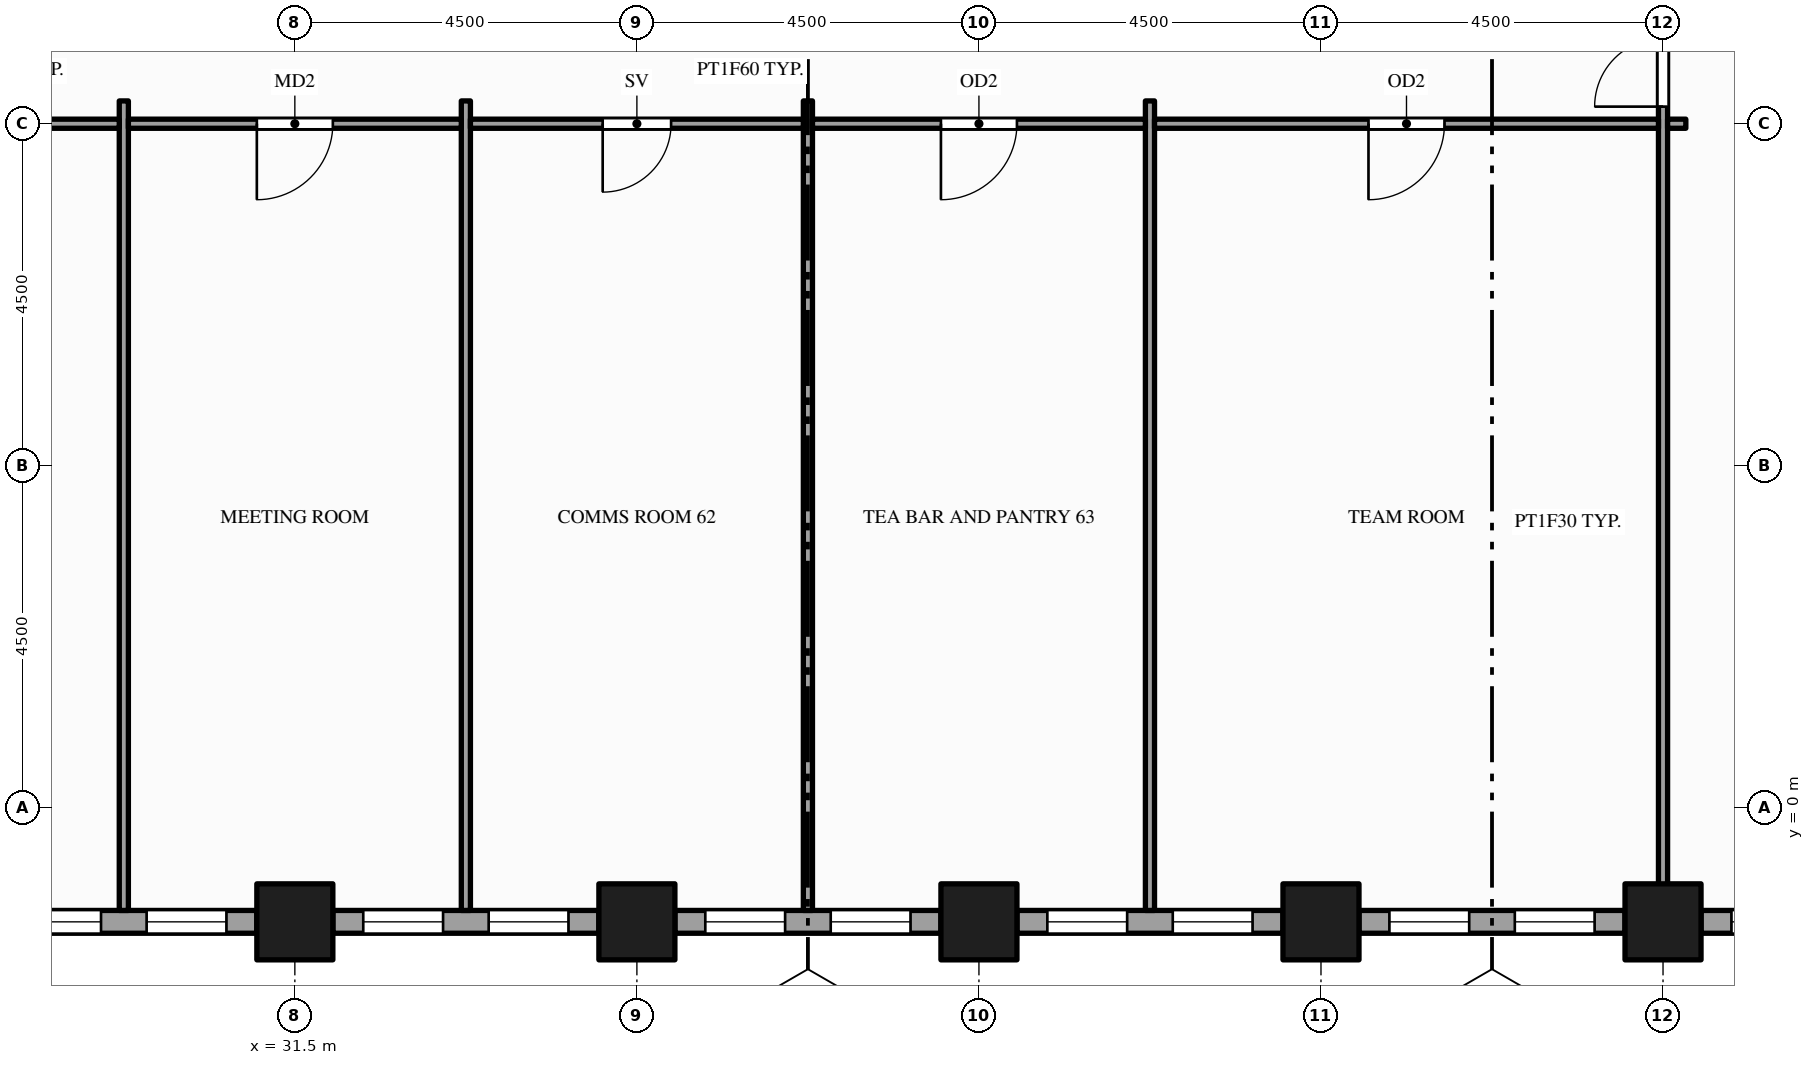
"""IFC4 building model, lengths in metres.
Left out: names, types, materials, properties, quantities, classifications, styles, units other than length and angle.
Written with IfcOpenShell. Run it as: python <this file> out.ifc"""

import sys

from ifc_helpers import new_model, si_unit, direction, frame, frame_2d, origin, origin_2d, place, context, subcontext, project, spatial, rectangle, hollow_rectangle, extrude, element, fill, save


model = new_model("IFC4")
c1 = context("Model", 3, precision=1e-05, world=origin(), true_north=direction((0.0, 1.0)))
c2 = subcontext(c1, "Body", "Model", "MODEL_VIEW")
j1 = project(units=[si_unit("LENGTHUNIT", "METRE"), si_unit("PLANEANGLEUNIT", "RADIAN")], contexts=[c1])
p1 = place(None, origin())
s1 = spatial("IfcSite", under=j1, at=p1, CompositionType="ELEMENT")
p2 = place(p1, origin())
s2 = spatial("IfcBuilding", under=s1, at=p2, CompositionType="ELEMENT")
p3 = place(p2, frame((0.0, 0.0, 95.0)))
s3 = spatial("IfcBuildingStorey", under=s2, at=p3, CompositionType="ELEMENT", Elevation=95.0)
for number, where, z_axis, x_axis in (
    (1, (31.5, -1.5, -0.15), (0.0, 0.0, 1.0), (1.0, 0.0, 0.0)),
    (2, (36.0, -1.5, -0.15), (0.0, 0.0, 1.0), (1.0, 0.0, 0.0)),
    (3, (40.5, -1.5, -0.15), (0.0, 0.0, 1.0), (1.0, 0.0, 0.0)),
    (4, (45.0, -1.5, -0.15), (0.0, 0.0, 1.0), (1.0, 0.0, 0.0)),
    (5, (49.5, -1.5, -0.15), (0.0, 0.0, 1.0), (1.0, 0.0, 0.0)),
):
    element("IfcColumn", number, at=place(p3, frame(where, z_axis=z_axis, x_axis=x_axis)), inside=s3, PredefinedType="COLUMN", context=c2, shape_type="SweptSolid", body=[
        extrude(hollow_rectangle(XDim=1.0, YDim=1.0, WallThickness=0.05, at=origin_2d()), origin(), (0.0, 0.0, 1.0), 4.0),
    ])
p4 = place(p3, frame((27.5, -1.5, 0.0), z_axis=(0.0, 0.0, 1.0), x_axis=(1.0, 0.0, 0.0)))
e6 = element("IfcWall", 6, at=p4, inside=s3, PredefinedType="STANDARD", context=c2, shape_type="SweptSolid", body=[
    extrude(rectangle(XDim=3.5, YDim=0.3, at=frame_2d((1.75, 0.0))), origin(), (0.0, 0.0, 1.0), 3.154),
])
p5 = place(p4, frame((0.4, 0.0, 0.9)))
e7 = element("IfcOpeningElement", 7, at=p5, cuts=e6, PredefinedType="OPENING", context=c2, shape_type="SweptSolid", body=[
    extrude(rectangle(XDim=1.05, YDim=2.0, at=frame_2d((0.525, 1.0))), frame((0.0, 0.16, 0.0), z_axis=(0.0, -1.0, 0.0), x_axis=(1.0, 0.0, 0.0)), (0.0, 0.0, 1.0), 0.32),
])
p6 = place(p4, frame((2.05, 0.0, 0.9)))
e8 = element("IfcOpeningElement", 8, at=p6, cuts=e6, PredefinedType="OPENING", context=c2, shape_type="SweptSolid", body=[
    extrude(rectangle(XDim=1.05, YDim=2.0, at=frame_2d((0.525, 1.0))), frame((0.0, 0.16, 0.0), z_axis=(0.0, -1.0, 0.0), x_axis=(1.0, 0.0, 0.0)), (0.0, 0.0, 1.0), 0.32),
])
p7 = place(p3, frame((32.0, -1.5, 0.0), z_axis=(0.0, 0.0, 1.0), x_axis=(1.0, 0.0, 0.0)))
e9 = element("IfcWall", 9, at=p7, inside=s3, PredefinedType="STANDARD", context=c2, shape_type="SweptSolid", body=[
    extrude(rectangle(XDim=3.5, YDim=0.3, at=frame_2d((1.75, 0.0))), origin(), (0.0, 0.0, 1.0), 3.154),
])
p8 = place(p7, frame((0.4, 0.0, 0.9)))
e10 = element("IfcOpeningElement", 10, at=p8, cuts=e9, PredefinedType="OPENING", context=c2, shape_type="SweptSolid", body=[
    extrude(rectangle(XDim=1.05, YDim=2.0, at=frame_2d((0.525, 1.0))), frame((0.0, 0.16, 0.0), z_axis=(0.0, -1.0, 0.0), x_axis=(1.0, 0.0, 0.0)), (0.0, 0.0, 1.0), 0.32),
])
p9 = place(p7, frame((2.05, 0.0, 0.9)))
e11 = element("IfcOpeningElement", 11, at=p9, cuts=e9, PredefinedType="OPENING", context=c2, shape_type="SweptSolid", body=[
    extrude(rectangle(XDim=1.05, YDim=2.0, at=frame_2d((0.525, 1.0))), frame((0.0, 0.16, 0.0), z_axis=(0.0, -1.0, 0.0), x_axis=(1.0, 0.0, 0.0)), (0.0, 0.0, 1.0), 0.32),
])
p10 = place(p3, frame((36.5, -1.5, 0.0), z_axis=(0.0, 0.0, 1.0), x_axis=(1.0, 0.0, 0.0)))
e12 = element("IfcWall", 12, at=p10, inside=s3, PredefinedType="STANDARD", context=c2, shape_type="SweptSolid", body=[
    extrude(rectangle(XDim=3.5, YDim=0.3, at=frame_2d((1.75, 0.0))), origin(), (0.0, 0.0, 1.0), 3.154),
])
p11 = place(p10, frame((0.4, 0.0, 0.9)))
e13 = element("IfcOpeningElement", 13, at=p11, cuts=e12, PredefinedType="OPENING", context=c2, shape_type="SweptSolid", body=[
    extrude(rectangle(XDim=1.05, YDim=2.0, at=frame_2d((0.525, 1.0))), frame((0.0, 0.16, 0.0), z_axis=(0.0, -1.0, 0.0), x_axis=(1.0, 0.0, 0.0)), (0.0, 0.0, 1.0), 0.32),
])
p12 = place(p10, frame((2.05, 0.0, 0.9)))
e14 = element("IfcOpeningElement", 14, at=p12, cuts=e12, PredefinedType="OPENING", context=c2, shape_type="SweptSolid", body=[
    extrude(rectangle(XDim=1.05, YDim=2.0, at=frame_2d((0.525, 1.0))), frame((0.0, 0.16, 0.0), z_axis=(0.0, -1.0, 0.0), x_axis=(1.0, 0.0, 0.0)), (0.0, 0.0, 1.0), 0.32),
])
p13 = place(p3, frame((41.0, -1.5, 0.0), z_axis=(0.0, 0.0, 1.0), x_axis=(1.0, 0.0, 0.0)))
e15 = element("IfcWall", 15, at=p13, inside=s3, PredefinedType="STANDARD", context=c2, shape_type="SweptSolid", body=[
    extrude(rectangle(XDim=3.5, YDim=0.3, at=frame_2d((1.75, 0.0))), origin(), (0.0, 0.0, 1.0), 3.154),
])
p14 = place(p13, frame((0.4, 0.0, 0.9)))
e16 = element("IfcOpeningElement", 16, at=p14, cuts=e15, PredefinedType="OPENING", context=c2, shape_type="SweptSolid", body=[
    extrude(rectangle(XDim=1.05, YDim=2.0, at=frame_2d((0.525, 1.0))), frame((0.0, 0.16, 0.0), z_axis=(0.0, -1.0, 0.0), x_axis=(1.0, 0.0, 0.0)), (0.0, 0.0, 1.0), 0.32),
])
p15 = place(p13, frame((2.05, 0.0, 0.9)))
e17 = element("IfcOpeningElement", 17, at=p15, cuts=e15, PredefinedType="OPENING", context=c2, shape_type="SweptSolid", body=[
    extrude(rectangle(XDim=1.05, YDim=2.0, at=frame_2d((0.525, 1.0))), frame((0.0, 0.16, 0.0), z_axis=(0.0, -1.0, 0.0), x_axis=(1.0, 0.0, 0.0)), (0.0, 0.0, 1.0), 0.32),
])
p16 = place(p3, frame((45.5, -1.5, 0.0), z_axis=(0.0, 0.0, 1.0), x_axis=(1.0, 0.0, 0.0)))
e18 = element("IfcWall", 18, at=p16, inside=s3, PredefinedType="STANDARD", context=c2, shape_type="SweptSolid", body=[
    extrude(rectangle(XDim=3.5, YDim=0.3, at=frame_2d((1.75, 0.0))), origin(), (0.0, 0.0, 1.0), 3.154),
])
p17 = place(p16, frame((0.4, 0.0, 0.9)))
e19 = element("IfcOpeningElement", 19, at=p17, cuts=e18, PredefinedType="OPENING", context=c2, shape_type="SweptSolid", body=[
    extrude(rectangle(XDim=1.05, YDim=2.0, at=frame_2d((0.525, 1.0))), frame((0.0, 0.16, 0.0), z_axis=(0.0, -1.0, 0.0), x_axis=(1.0, 0.0, 0.0)), (0.0, 0.0, 1.0), 0.32),
])
p18 = place(p16, frame((2.05, 0.0, 0.9)))
e20 = element("IfcOpeningElement", 20, at=p18, cuts=e18, PredefinedType="OPENING", context=c2, shape_type="SweptSolid", body=[
    extrude(rectangle(XDim=1.05, YDim=2.0, at=frame_2d((0.525, 1.0))), frame((0.0, 0.16, 0.0), z_axis=(0.0, -1.0, 0.0), x_axis=(1.0, 0.0, 0.0)), (0.0, 0.0, 1.0), 0.32),
])
p19 = place(p3, frame((50.0, -1.5, 0.0), z_axis=(0.0, 0.0, 1.0), x_axis=(1.0, 0.0, 0.0)))
e21 = element("IfcWall", 21, at=p19, inside=s3, PredefinedType="STANDARD", context=c2, shape_type="SweptSolid", body=[
    extrude(rectangle(XDim=3.5, YDim=0.3, at=frame_2d((1.75, 0.0))), origin(), (0.0, 0.0, 1.0), 3.154),
])
p20 = place(p19, frame((0.4, 0.0, 0.9)))
e22 = element("IfcOpeningElement", 22, at=p20, cuts=e21, PredefinedType="OPENING", context=c2, shape_type="SweptSolid", body=[
    extrude(rectangle(XDim=1.05, YDim=2.0, at=frame_2d((0.525, 1.0))), frame((0.0, 0.16, 0.0), z_axis=(0.0, -1.0, 0.0), x_axis=(1.0, 0.0, 0.0)), (0.0, 0.0, 1.0), 0.32),
])
p21 = place(p19, frame((2.05, 0.0, 0.9)))
e23 = element("IfcOpeningElement", 23, at=p21, cuts=e21, PredefinedType="OPENING", context=c2, shape_type="SweptSolid", body=[
    extrude(rectangle(XDim=1.05, YDim=2.0, at=frame_2d((0.525, 1.0))), frame((0.0, 0.16, 0.0), z_axis=(0.0, -1.0, 0.0), x_axis=(1.0, 0.0, 0.0)), (0.0, 0.0, 1.0), 0.32),
])
for number, where, z_axis, x_axis in (
    (24, (29.25, -1.35, 0.0), (0.0, 0.0, 1.0), (0.0, 1.0, 0.0)),
    (25, (33.75, -1.35, 0.0), (0.0, 0.0, 1.0), (0.0, 1.0, 0.0)),
    (26, (38.25, -1.35, 0.0), (0.0, 0.0, 1.0), (0.0, 1.0, 0.0)),
    (27, (42.75, -1.35, 0.0), (0.0, 0.0, 1.0), (0.0, 1.0, 0.0)),
):
    element("IfcWall", number, at=place(p3, frame(where, z_axis=z_axis, x_axis=x_axis)), inside=s3, PredefinedType="PARTITIONING", context=c2, shape_type="SweptSolid", body=[
        extrude(rectangle(XDim=10.65, YDim=0.12, at=frame_2d((5.325, 0.0))), origin(), (0.0, 0.0, 1.0), 2.938),
    ])
p22 = place(p3, frame((49.5, -1.35, 0.0), z_axis=(0.0, 0.0, 1.0), x_axis=(0.0, 1.0, 0.0)))
e28 = element("IfcWall", 28, at=p22, inside=s3, PredefinedType="PARTITIONING", context=c2, shape_type="SweptSolid", body=[
    extrude(rectangle(XDim=22.2, YDim=0.12, at=frame_2d((11.1, 0.0))), origin(), (0.0, 0.0, 1.0), 2.938),
])
p23 = place(p22, frame((10.575, 0.0, 0.0)))
e29 = element("IfcOpeningElement", 29, at=p23, cuts=e28, PredefinedType="OPENING", context=c2, shape_type="SweptSolid", body=[
    extrude(rectangle(XDim=1.8, YDim=2.1, at=frame_2d((0.9, 1.05))), frame((0.0, 0.07, 0.0), z_axis=(0.0, -1.0, 0.0), x_axis=(1.0, 0.0, 0.0)), (0.0, 0.0, 1.0), 0.14),
])
p24 = place(p22, frame((13.6, 0.0, 0.0)))
e30 = element("IfcOpeningElement", 30, at=p24, cuts=e28, PredefinedType="OPENING", context=c2, shape_type="SweptSolid", body=[
    extrude(rectangle(XDim=0.9, YDim=2.1, at=frame_2d((0.45, 1.05))), frame((0.0, 0.07, 0.0), z_axis=(0.0, -1.0, 0.0), x_axis=(1.0, 0.0, 0.0)), (0.0, 0.0, 1.0), 0.14),
])
p25 = place(p22, frame((17.025, 0.0, 0.0)))
e31 = element("IfcOpeningElement", 31, at=p25, cuts=e28, PredefinedType="OPENING", context=c2, shape_type="SweptSolid", body=[
    extrude(rectangle(XDim=0.9, YDim=2.1, at=frame_2d((0.45, 1.05))), frame((0.0, 0.07, 0.0), z_axis=(0.0, -1.0, 0.0), x_axis=(1.0, 0.0, 0.0)), (0.0, 0.0, 1.0), 0.14),
])
p26 = place(p22, frame((20.35, 0.0, 0.0)))
e32 = element("IfcOpeningElement", 32, at=p26, cuts=e28, PredefinedType="OPENING", context=c2, shape_type="SweptSolid", body=[
    extrude(rectangle(XDim=1.0, YDim=2.1, at=frame_2d((0.5, 1.05))), frame((0.0, 0.07, 0.0), z_axis=(0.0, -1.0, 0.0), x_axis=(1.0, 0.0, 0.0)), (0.0, 0.0, 1.0), 0.14),
])
p27 = place(p3, frame((22.56, 9.0, 0.0), z_axis=(0.0, 0.0, 1.0), x_axis=(1.0, 0.0, 0.0)))
e33 = element("IfcWall", 33, at=p27, inside=s3, PredefinedType="PARTITIONING", context=c2, shape_type="SweptSolid", body=[
    extrude(rectangle(XDim=6.63, YDim=0.12, at=frame_2d((3.315, 0.0))), origin(), (0.0, 0.0, 1.0), 2.76),
])
p28 = place(p27, frame((2.815, 0.0, 0.0)))
e34 = element("IfcOpeningElement", 34, at=p28, cuts=e33, PredefinedType="OPENING", context=c2, shape_type="SweptSolid", body=[
    extrude(rectangle(XDim=1.0, YDim=2.1, at=frame_2d((0.5, 1.05))), frame((0.0, 0.07, 0.0), z_axis=(0.0, -1.0, 0.0), x_axis=(1.0, 0.0, 0.0)), (0.0, 0.0, 1.0), 0.14),
])
p29 = place(p3, frame((29.31, 9.0, 0.0), z_axis=(0.0, 0.0, 1.0), x_axis=(1.0, 0.0, 0.0)))
e35 = element("IfcWall", 35, at=p29, inside=s3, PredefinedType="PARTITIONING", context=c2, shape_type="SweptSolid", body=[
    extrude(rectangle(XDim=4.38, YDim=0.12, at=frame_2d((2.19, 0.0))), origin(), (0.0, 0.0, 1.0), 2.938),
])
p30 = place(p29, frame((1.69, 0.0, 0.0)))
e36 = element("IfcOpeningElement", 36, at=p30, cuts=e35, PredefinedType="OPENING", context=c2, shape_type="SweptSolid", body=[
    extrude(rectangle(XDim=1.0, YDim=2.1, at=frame_2d((0.5, 1.05))), frame((0.0, 0.07, 0.0), z_axis=(0.0, -1.0, 0.0), x_axis=(1.0, 0.0, 0.0)), (0.0, 0.0, 1.0), 0.14),
])
p31 = place(p3, frame((33.81, 9.0, 0.0), z_axis=(0.0, 0.0, 1.0), x_axis=(1.0, 0.0, 0.0)))
e37 = element("IfcWall", 37, at=p31, inside=s3, PredefinedType="PARTITIONING", context=c2, shape_type="SweptSolid", body=[
    extrude(rectangle(XDim=4.38, YDim=0.12, at=frame_2d((2.19, 0.0))), origin(), (0.0, 0.0, 1.0), 2.938),
])
p32 = place(p31, frame((1.74, 0.0, 0.0)))
e38 = element("IfcOpeningElement", 38, at=p32, cuts=e37, PredefinedType="OPENING", context=c2, shape_type="SweptSolid", body=[
    extrude(rectangle(XDim=0.9, YDim=2.1, at=frame_2d((0.45, 1.05))), frame((0.0, 0.07, 0.0), z_axis=(0.0, -1.0, 0.0), x_axis=(1.0, 0.0, 0.0)), (0.0, 0.0, 1.0), 0.14),
])
p33 = place(p3, frame((38.31, 9.0, 0.0), z_axis=(0.0, 0.0, 1.0), x_axis=(1.0, 0.0, 0.0)))
e39 = element("IfcWall", 39, at=p33, inside=s3, PredefinedType="PARTITIONING", context=c2, shape_type="SweptSolid", body=[
    extrude(rectangle(XDim=4.38, YDim=0.12, at=frame_2d((2.19, 0.0))), origin(), (0.0, 0.0, 1.0), 2.938),
])
p34 = place(p33, frame((1.69, 0.0, 0.0)))
e40 = element("IfcOpeningElement", 40, at=p34, cuts=e39, PredefinedType="OPENING", context=c2, shape_type="SweptSolid", body=[
    extrude(rectangle(XDim=1.0, YDim=2.1, at=frame_2d((0.5, 1.05))), frame((0.0, 0.07, 0.0), z_axis=(0.0, -1.0, 0.0), x_axis=(1.0, 0.0, 0.0)), (0.0, 0.0, 1.0), 0.14),
])
p35 = place(p3, frame((42.81, 9.0, 0.0), z_axis=(0.0, 0.0, 1.0), x_axis=(1.0, 0.0, 0.0)))
e41 = element("IfcWall", 41, at=p35, inside=s3, PredefinedType="PARTITIONING", context=c2, shape_type="SweptSolid", body=[
    extrude(rectangle(XDim=6.63, YDim=0.12, at=frame_2d((3.315, 0.0))), origin(), (0.0, 0.0, 1.0), 2.938),
])
p36 = place(p35, frame((2.815, 0.0, 0.0)))
e42 = element("IfcOpeningElement", 42, at=p36, cuts=e41, PredefinedType="OPENING", context=c2, shape_type="SweptSolid", body=[
    extrude(rectangle(XDim=1.0, YDim=2.1, at=frame_2d((0.5, 1.05))), frame((0.0, 0.07, 0.0), z_axis=(0.0, -1.0, 0.0), x_axis=(1.0, 0.0, 0.0)), (0.0, 0.0, 1.0), 0.14),
])
p37 = place(p3, frame((49.56, 9.0, 0.0), z_axis=(0.0, 0.0, 1.0), x_axis=(1.0, 0.0, 0.0)))
e43 = element("IfcWall", 43, at=p37, inside=s3, PredefinedType="PARTITIONING", context=c2, shape_type="SweptSolid", body=[
    extrude(rectangle(XDim=0.24, YDim=0.12, at=frame_2d((0.12, 0.0))), origin(), (0.0, 0.0, 1.0), 2.938),
])
p38 = place(p5, origin())
e44 = element("IfcWindow", 44, at=p38, inside=s3, PartitioningType="SINGLE_PANEL", PredefinedType="WINDOW", context=c2, shape_type="SweptSolid", body=[
    extrude(rectangle(XDim=1.05, YDim=2.0, at=frame_2d((0.525, 1.0))), frame((0.0, 0.03, 0.0), z_axis=(0.0, -1.0, 0.0), x_axis=(1.0, 0.0, 0.0)), (0.0, 0.0, 1.0), 0.06),
])
fill(e7, e44)
p39 = place(p6, origin())
e45 = element("IfcWindow", 45, at=p39, inside=s3, PartitioningType="SINGLE_PANEL", PredefinedType="WINDOW", context=c2, shape_type="SweptSolid", body=[
    extrude(rectangle(XDim=1.05, YDim=2.0, at=frame_2d((0.525, 1.0))), frame((0.0, 0.03, 0.0), z_axis=(0.0, -1.0, 0.0), x_axis=(1.0, 0.0, 0.0)), (0.0, 0.0, 1.0), 0.06),
])
fill(e8, e45)
p40 = place(p8, origin())
e46 = element("IfcWindow", 46, at=p40, inside=s3, PartitioningType="SINGLE_PANEL", PredefinedType="WINDOW", context=c2, shape_type="SweptSolid", body=[
    extrude(rectangle(XDim=1.05, YDim=2.0, at=frame_2d((0.525, 1.0))), frame((0.0, 0.03, 0.0), z_axis=(0.0, -1.0, 0.0), x_axis=(1.0, 0.0, 0.0)), (0.0, 0.0, 1.0), 0.06),
])
fill(e10, e46)
p41 = place(p9, origin())
e47 = element("IfcWindow", 47, at=p41, inside=s3, PartitioningType="SINGLE_PANEL", PredefinedType="WINDOW", context=c2, shape_type="SweptSolid", body=[
    extrude(rectangle(XDim=1.05, YDim=2.0, at=frame_2d((0.525, 1.0))), frame((0.0, 0.03, 0.0), z_axis=(0.0, -1.0, 0.0), x_axis=(1.0, 0.0, 0.0)), (0.0, 0.0, 1.0), 0.06),
])
fill(e11, e47)
p42 = place(p11, origin())
e48 = element("IfcWindow", 48, at=p42, inside=s3, PartitioningType="SINGLE_PANEL", PredefinedType="WINDOW", context=c2, shape_type="SweptSolid", body=[
    extrude(rectangle(XDim=1.05, YDim=2.0, at=frame_2d((0.525, 1.0))), frame((0.0, 0.03, 0.0), z_axis=(0.0, -1.0, 0.0), x_axis=(1.0, 0.0, 0.0)), (0.0, 0.0, 1.0), 0.06),
])
fill(e13, e48)
p43 = place(p12, origin())
e49 = element("IfcWindow", 49, at=p43, inside=s3, PartitioningType="SINGLE_PANEL", PredefinedType="WINDOW", context=c2, shape_type="SweptSolid", body=[
    extrude(rectangle(XDim=1.05, YDim=2.0, at=frame_2d((0.525, 1.0))), frame((0.0, 0.03, 0.0), z_axis=(0.0, -1.0, 0.0), x_axis=(1.0, 0.0, 0.0)), (0.0, 0.0, 1.0), 0.06),
])
fill(e14, e49)
p44 = place(p14, origin())
e50 = element("IfcWindow", 50, at=p44, inside=s3, PartitioningType="SINGLE_PANEL", PredefinedType="WINDOW", context=c2, shape_type="SweptSolid", body=[
    extrude(rectangle(XDim=1.05, YDim=2.0, at=frame_2d((0.525, 1.0))), frame((0.0, 0.03, 0.0), z_axis=(0.0, -1.0, 0.0), x_axis=(1.0, 0.0, 0.0)), (0.0, 0.0, 1.0), 0.06),
])
fill(e16, e50)
p45 = place(p15, origin())
e51 = element("IfcWindow", 51, at=p45, inside=s3, PartitioningType="SINGLE_PANEL", PredefinedType="WINDOW", context=c2, shape_type="SweptSolid", body=[
    extrude(rectangle(XDim=1.05, YDim=2.0, at=frame_2d((0.525, 1.0))), frame((0.0, 0.03, 0.0), z_axis=(0.0, -1.0, 0.0), x_axis=(1.0, 0.0, 0.0)), (0.0, 0.0, 1.0), 0.06),
])
fill(e17, e51)
p46 = place(p17, origin())
e52 = element("IfcWindow", 52, at=p46, inside=s3, PartitioningType="SINGLE_PANEL", PredefinedType="WINDOW", context=c2, shape_type="SweptSolid", body=[
    extrude(rectangle(XDim=1.05, YDim=2.0, at=frame_2d((0.525, 1.0))), frame((0.0, 0.03, 0.0), z_axis=(0.0, -1.0, 0.0), x_axis=(1.0, 0.0, 0.0)), (0.0, 0.0, 1.0), 0.06),
])
fill(e19, e52)
p47 = place(p18, origin())
e53 = element("IfcWindow", 53, at=p47, inside=s3, PartitioningType="SINGLE_PANEL", PredefinedType="WINDOW", context=c2, shape_type="SweptSolid", body=[
    extrude(rectangle(XDim=1.05, YDim=2.0, at=frame_2d((0.525, 1.0))), frame((0.0, 0.03, 0.0), z_axis=(0.0, -1.0, 0.0), x_axis=(1.0, 0.0, 0.0)), (0.0, 0.0, 1.0), 0.06),
])
fill(e20, e53)
p48 = place(p20, origin())
e54 = element("IfcWindow", 54, at=p48, inside=s3, PartitioningType="SINGLE_PANEL", PredefinedType="WINDOW", context=c2, shape_type="SweptSolid", body=[
    extrude(rectangle(XDim=1.05, YDim=2.0, at=frame_2d((0.525, 1.0))), frame((0.0, 0.03, 0.0), z_axis=(0.0, -1.0, 0.0), x_axis=(1.0, 0.0, 0.0)), (0.0, 0.0, 1.0), 0.06),
])
fill(e22, e54)
p49 = place(p23, origin())
e55 = element("IfcDoor", 55, at=p49, inside=s3, OperationType="DOUBLE_DOOR_SINGLE_SWING", PredefinedType="DOOR", context=c2, shape_type="SweptSolid", body=[
    extrude(rectangle(XDim=1.8, YDim=2.1, at=frame_2d((0.9, 1.05))), frame((0.0, 0.025, 0.0), z_axis=(0.0, -1.0, 0.0), x_axis=(1.0, 0.0, 0.0)), (0.0, 0.0, 1.0), 0.05),
])
fill(e29, e55)
p50 = place(p30, origin())
e56 = element("IfcDoor", 56, at=p50, inside=s3, OperationType="SINGLE_SWING_LEFT", PredefinedType="DOOR", context=c2, shape_type="SweptSolid", body=[
    extrude(rectangle(XDim=1.0, YDim=2.1, at=frame_2d((0.5, 1.05))), frame((0.0, 0.025, 0.0), z_axis=(0.0, -1.0, 0.0), x_axis=(1.0, 0.0, 0.0)), (0.0, 0.0, 1.0), 0.05),
])
fill(e36, e56)
p51 = place(p32, origin())
e57 = element("IfcDoor", 57, at=p51, inside=s3, OperationType="SINGLE_SWING_LEFT", PredefinedType="DOOR", context=c2, shape_type="SweptSolid", body=[
    extrude(rectangle(XDim=0.9, YDim=2.1, at=frame_2d((0.45, 1.05))), frame((0.0, 0.025, 0.0), z_axis=(0.0, -1.0, 0.0), x_axis=(1.0, 0.0, 0.0)), (0.0, 0.0, 1.0), 0.05),
])
fill(e38, e57)
p52 = place(p34, origin())
e58 = element("IfcDoor", 58, at=p52, inside=s3, OperationType="SINGLE_SWING_LEFT", PredefinedType="DOOR", context=c2, shape_type="SweptSolid", body=[
    extrude(rectangle(XDim=1.0, YDim=2.1, at=frame_2d((0.5, 1.05))), frame((0.0, 0.025, 0.0), z_axis=(0.0, -1.0, 0.0), x_axis=(1.0, 0.0, 0.0)), (0.0, 0.0, 1.0), 0.05),
])
fill(e40, e58)
p53 = place(p36, origin())
e59 = element("IfcDoor", 59, at=p53, inside=s3, OperationType="SINGLE_SWING_LEFT", PredefinedType="DOOR", context=c2, shape_type="SweptSolid", body=[
    extrude(rectangle(XDim=1.0, YDim=2.1, at=frame_2d((0.5, 1.05))), frame((0.0, 0.025, 0.0), z_axis=(0.0, -1.0, 0.0), x_axis=(1.0, 0.0, 0.0)), (0.0, 0.0, 1.0), 0.05),
])
fill(e42, e59)
save(model, sys.argv[1])
